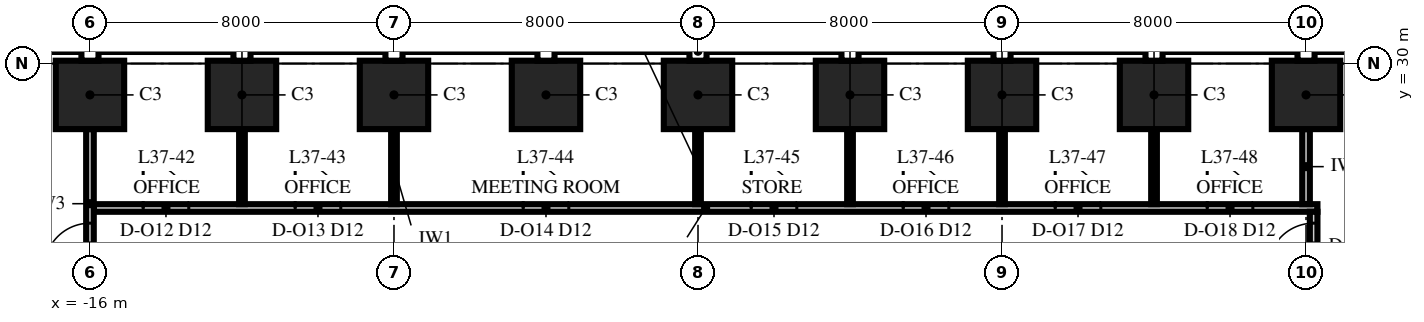
"""IFC4 building model, lengths in metres.
Left out: names, types, materials, properties, quantities, classifications, styles, units other than length and angle.
Written with IfcOpenShell. Run it as: python <this file> out.ifc"""

import sys

from ifc_helpers import new_model, si_unit, direction, frame, frame_2d, origin, origin_2d, place, context, subcontext, project, spatial, rectangle, extrude, element, fill, save


model = new_model("IFC4")
c1 = context("Model", 3, precision=1e-05, world=origin(), true_north=direction((0.0, 1.0)))
c2 = subcontext(c1, "Body", "Model", "MODEL_VIEW")
j1 = project(units=[si_unit("LENGTHUNIT", "METRE"), si_unit("PLANEANGLEUNIT", "RADIAN")], contexts=[c1])
p1 = place(None, origin())
s1 = spatial("IfcSite", under=j1, at=p1, CompositionType="ELEMENT")
p2 = place(p1, origin())
s2 = spatial("IfcBuilding", under=s1, at=p2, CompositionType="ELEMENT")
p3 = place(p2, frame((0.0, 0.0, 163.0)))
s3 = spatial("IfcBuildingStorey", under=s2, at=p3, CompositionType="ELEMENT", Elevation=163.0)
for number, where, z_axis, x_axis in (
    (1, (16.0, 29.175, 0.0), (0.0, 0.0, 1.0), (-1.0, 0.0, 0.0)),
    (2, (12.0, 29.175, 0.0), (0.0, 0.0, 1.0), (-1.0, 0.0, 0.0)),
    (3, (8.0, 29.175, 0.0), (0.0, 0.0, 1.0), (-1.0, 0.0, 0.0)),
    (4, (4.0, 29.175, 0.0), (0.0, 0.0, 1.0), (-1.0, 0.0, 0.0)),
    (5, (0.0, 29.175, 0.0), (0.0, 0.0, 1.0), (-1.0, 0.0, 0.0)),
    (6, (-4.0, 29.175, 0.0), (0.0, 0.0, 1.0), (-1.0, 0.0, 0.0)),
    (7, (-8.0, 29.175, 0.0), (0.0, 0.0, 1.0), (-1.0, 0.0, 0.0)),
    (8, (-12.0, 29.175, 0.0), (0.0, 0.0, 1.0), (-1.0, 0.0, 0.0)),
    (9, (-16.0, 29.175, 0.0), (0.0, 0.0, 1.0), (-1.0, 0.0, 0.0)),
):
    element("IfcColumn", number, at=place(p3, frame(where, z_axis=z_axis, x_axis=x_axis)), inside=s3, PredefinedType="COLUMN", context=c2, shape_type="SweptSolid", body=[
        extrude(rectangle(XDim=1.8, YDim=1.8, at=origin_2d()), origin(), (0.0, 0.0, 1.0), 4.0),
    ])
p4 = place(p3, frame((-15.9, 26.2, 0.0), z_axis=(0.0, 0.0, 1.0), x_axis=(1.0, 0.0, 0.0)))
e10 = element("IfcWall", 10, at=p4, inside=s3, PredefinedType="PARTITIONING", context=c2, shape_type="SweptSolid", body=[
    extrude(rectangle(XDim=32.2, YDim=0.2, at=frame_2d((16.1, 0.0))), origin(), (0.0, 0.0, 1.0), 3.318),
])
p5 = place(p4, frame((1.3, 0.0, 0.0)))
e11 = element("IfcOpeningElement", 11, at=p5, cuts=e10, PredefinedType="OPENING", context=c2, shape_type="SweptSolid", body=[
    extrude(rectangle(XDim=1.2, YDim=2.4, at=frame_2d((0.6, 1.2))), frame((0.0, 0.115, 0.0), z_axis=(0.0, -1.0, 0.0), x_axis=(1.0, 0.0, 0.0)), (0.0, 0.0, 1.0), 0.23),
])
p6 = place(p4, frame((5.3, 0.0, 0.0)))
e12 = element("IfcOpeningElement", 12, at=p6, cuts=e10, PredefinedType="OPENING", context=c2, shape_type="SweptSolid", body=[
    extrude(rectangle(XDim=1.2, YDim=2.4, at=frame_2d((0.6, 1.2))), frame((0.0, 0.115, 0.0), z_axis=(0.0, -1.0, 0.0), x_axis=(1.0, 0.0, 0.0)), (0.0, 0.0, 1.0), 0.23),
])
p7 = place(p4, frame((11.3, 0.0, 0.0)))
e13 = element("IfcOpeningElement", 13, at=p7, cuts=e10, PredefinedType="OPENING", context=c2, shape_type="SweptSolid", body=[
    extrude(rectangle(XDim=1.2, YDim=2.4, at=frame_2d((0.6, 1.2))), frame((0.0, 0.115, 0.0), z_axis=(0.0, -1.0, 0.0), x_axis=(1.0, 0.0, 0.0)), (0.0, 0.0, 1.0), 0.23),
])
p8 = place(p4, frame((17.3, 0.0, 0.0)))
e14 = element("IfcOpeningElement", 14, at=p8, cuts=e10, PredefinedType="OPENING", context=c2, shape_type="SweptSolid", body=[
    extrude(rectangle(XDim=1.2, YDim=2.4, at=frame_2d((0.6, 1.2))), frame((0.0, 0.115, 0.0), z_axis=(0.0, -1.0, 0.0), x_axis=(1.0, 0.0, 0.0)), (0.0, 0.0, 1.0), 0.23),
])
p9 = place(p4, frame((21.3, 0.0, 0.0)))
e15 = element("IfcOpeningElement", 15, at=p9, cuts=e10, PredefinedType="OPENING", context=c2, shape_type="SweptSolid", body=[
    extrude(rectangle(XDim=1.2, YDim=2.4, at=frame_2d((0.6, 1.2))), frame((0.0, 0.115, 0.0), z_axis=(0.0, -1.0, 0.0), x_axis=(1.0, 0.0, 0.0)), (0.0, 0.0, 1.0), 0.23),
])
p10 = place(p4, frame((25.3, 0.0, 0.0)))
e16 = element("IfcOpeningElement", 16, at=p10, cuts=e10, PredefinedType="OPENING", context=c2, shape_type="SweptSolid", body=[
    extrude(rectangle(XDim=1.2, YDim=2.4, at=frame_2d((0.6, 1.2))), frame((0.0, 0.115, 0.0), z_axis=(0.0, -1.0, 0.0), x_axis=(1.0, 0.0, 0.0)), (0.0, 0.0, 1.0), 0.23),
])
p11 = place(p4, frame((29.3, 0.0, 0.0)))
e17 = element("IfcOpeningElement", 17, at=p11, cuts=e10, PredefinedType="OPENING", context=c2, shape_type="SweptSolid", body=[
    extrude(rectangle(XDim=1.2, YDim=2.4, at=frame_2d((0.6, 1.2))), frame((0.0, 0.115, 0.0), z_axis=(0.0, -1.0, 0.0), x_axis=(1.0, 0.0, 0.0)), (0.0, 0.0, 1.0), 0.23),
])
p12 = place(p3, frame((-16.0, 24.35, 0.0), z_axis=(0.0, 0.0, 1.0), x_axis=(0.0, 1.0, 0.0)))
e18 = element("IfcWall", 18, at=p12, inside=s3, PredefinedType="PARTITIONING", context=c2, shape_type="SweptSolid", body=[
    extrude(rectangle(XDim=3.925, YDim=0.2, at=frame_2d((1.962, 0.0))), origin(), (0.0, 0.0, 1.0), 3.226),
])
p13 = place(p12, frame((0.25, 0.0, 0.0)))
e19 = element("IfcOpeningElement", 19, at=p13, cuts=e18, PredefinedType="OPENING", context=c2, shape_type="SweptSolid", body=[
    extrude(rectangle(XDim=1.2, YDim=2.4, at=frame_2d((0.6, 1.2))), frame((0.0, 0.115, 0.0), z_axis=(0.0, -1.0, 0.0), x_axis=(1.0, 0.0, 0.0)), (0.0, 0.0, 1.0), 0.23),
])
for number, where, z_axis, x_axis in (
    (20, (-12.0, 26.3, 0.0), (0.0, 0.0, 1.0), (0.0, 1.0, 0.0)),
    (21, (-8.0, 26.3, 0.0), (0.0, 0.0, 1.0), (0.0, 1.0, 0.0)),
    (22, (0.0, 26.3, 0.0), (0.0, 0.0, 1.0), (0.0, 1.0, 0.0)),
    (23, (4.0, 26.3, 0.0), (0.0, 0.0, 1.0), (0.0, 1.0, 0.0)),
    (24, (8.0, 26.3, 0.0), (0.0, 0.0, 1.0), (0.0, 1.0, 0.0)),
    (25, (12.0, 26.3, 0.0), (0.0, 0.0, 1.0), (0.0, 1.0, 0.0)),
):
    element("IfcWall", number, at=place(p3, frame(where, z_axis=z_axis, x_axis=x_axis)), inside=s3, PredefinedType="PARTITIONING", context=c2, shape_type="SweptSolid", body=[
        extrude(rectangle(XDim=1.975, YDim=0.15, at=frame_2d((0.987, 0.0))), origin(), (0.0, 0.0, 1.0), 3.318),
    ])
p14 = place(p3, frame((16.0, 26.3, 0.0), z_axis=(0.0, 0.0, 1.0), x_axis=(0.0, 1.0, 0.0)))
e26 = element("IfcWall", 26, at=p14, inside=s3, PredefinedType="PARTITIONING", context=c2, shape_type="SweptSolid", body=[
    extrude(rectangle(XDim=1.975, YDim=0.2, at=frame_2d((0.987, 0.0))), origin(), (0.0, 0.0, 1.0), 3.318),
])
p15 = place(p3, frame((16.2, 9.9, 0.0), z_axis=(0.0, 0.0, 1.0), x_axis=(0.0, 1.0, 0.0)))
e27 = element("IfcWall", 27, at=p15, inside=s3, PredefinedType="PARTITIONING", context=c2, shape_type="SweptSolid", body=[
    extrude(rectangle(XDim=16.2, YDim=0.2, at=frame_2d((8.1, 0.0))), origin(), (0.0, 0.0, 1.0), 3.13),
])
p16 = place(p15, frame((14.7, 0.0, 0.0)))
e28 = element("IfcOpeningElement", 28, at=p16, cuts=e27, PredefinedType="OPENING", context=c2, shape_type="SweptSolid", body=[
    extrude(rectangle(XDim=1.2, YDim=2.4, at=frame_2d((0.6, 1.2))), frame((0.0, 0.115, 0.0), z_axis=(0.0, -1.0, 0.0), x_axis=(1.0, 0.0, 0.0)), (0.0, 0.0, 1.0), 0.23),
])
p17 = place(p5, origin())
e29 = element("IfcDoor", 29, at=p17, inside=s3, OperationType="SINGLE_SWING_LEFT", PredefinedType="DOOR", context=c2, shape_type="SweptSolid", body=[
    extrude(rectangle(XDim=1.2, YDim=2.4, at=frame_2d((0.6, 1.2))), frame((0.0, 0.1, 0.0), z_axis=(0.0, -1.0, 0.0), x_axis=(1.0, 0.0, 0.0)), (0.0, 0.0, 1.0), 0.199),
])
fill(e11, e29)
p18 = place(p6, origin())
e30 = element("IfcDoor", 30, at=p18, inside=s3, OperationType="SINGLE_SWING_LEFT", PredefinedType="DOOR", context=c2, shape_type="SweptSolid", body=[
    extrude(rectangle(XDim=1.2, YDim=2.4, at=frame_2d((0.6, 1.2))), frame((0.0, 0.1, 0.0), z_axis=(0.0, -1.0, 0.0), x_axis=(1.0, 0.0, 0.0)), (0.0, 0.0, 1.0), 0.199),
])
fill(e12, e30)
p19 = place(p7, origin())
e31 = element("IfcDoor", 31, at=p19, inside=s3, OperationType="SINGLE_SWING_LEFT", PredefinedType="DOOR", context=c2, shape_type="SweptSolid", body=[
    extrude(rectangle(XDim=1.2, YDim=2.4, at=frame_2d((0.6, 1.2))), frame((0.0, 0.1, 0.0), z_axis=(0.0, -1.0, 0.0), x_axis=(1.0, 0.0, 0.0)), (0.0, 0.0, 1.0), 0.199),
])
fill(e13, e31)
p20 = place(p8, origin())
e32 = element("IfcDoor", 32, at=p20, inside=s3, OperationType="SINGLE_SWING_LEFT", PredefinedType="DOOR", context=c2, shape_type="SweptSolid", body=[
    extrude(rectangle(XDim=1.2, YDim=2.4, at=frame_2d((0.6, 1.2))), frame((0.0, 0.1, 0.0), z_axis=(0.0, -1.0, 0.0), x_axis=(1.0, 0.0, 0.0)), (0.0, 0.0, 1.0), 0.199),
])
fill(e14, e32)
p21 = place(p9, origin())
e33 = element("IfcDoor", 33, at=p21, inside=s3, OperationType="SINGLE_SWING_LEFT", PredefinedType="DOOR", context=c2, shape_type="SweptSolid", body=[
    extrude(rectangle(XDim=1.2, YDim=2.4, at=frame_2d((0.6, 1.2))), frame((0.0, 0.1, 0.0), z_axis=(0.0, -1.0, 0.0), x_axis=(1.0, 0.0, 0.0)), (0.0, 0.0, 1.0), 0.199),
])
fill(e15, e33)
p22 = place(p10, origin())
e34 = element("IfcDoor", 34, at=p22, inside=s3, OperationType="SINGLE_SWING_LEFT", PredefinedType="DOOR", context=c2, shape_type="SweptSolid", body=[
    extrude(rectangle(XDim=1.2, YDim=2.4, at=frame_2d((0.6, 1.2))), frame((0.0, 0.1, 0.0), z_axis=(0.0, -1.0, 0.0), x_axis=(1.0, 0.0, 0.0)), (0.0, 0.0, 1.0), 0.199),
])
fill(e16, e34)
p23 = place(p11, origin())
e35 = element("IfcDoor", 35, at=p23, inside=s3, OperationType="SINGLE_SWING_LEFT", PredefinedType="DOOR", context=c2, shape_type="SweptSolid", body=[
    extrude(rectangle(XDim=1.2, YDim=2.4, at=frame_2d((0.6, 1.2))), frame((0.0, 0.1, 0.0), z_axis=(0.0, -1.0, 0.0), x_axis=(1.0, 0.0, 0.0)), (0.0, 0.0, 1.0), 0.199),
])
fill(e17, e35)
p24 = place(p13, origin())
e36 = element("IfcDoor", 36, at=p24, inside=s3, OperationType="SINGLE_SWING_LEFT", PredefinedType="DOOR", context=c2, shape_type="SweptSolid", body=[
    extrude(rectangle(XDim=1.2, YDim=2.4, at=frame_2d((0.6, 1.2))), frame((0.0, 0.1, 0.0), z_axis=(0.0, -1.0, 0.0), x_axis=(1.0, 0.0, 0.0)), (0.0, 0.0, 1.0), 0.199),
])
fill(e19, e36)
p25 = place(p16, origin())
e37 = element("IfcDoor", 37, at=p25, inside=s3, OperationType="SINGLE_SWING_LEFT", PredefinedType="DOOR", context=c2, shape_type="SweptSolid", body=[
    extrude(rectangle(XDim=1.2, YDim=2.4, at=frame_2d((0.6, 1.2))), frame((0.0, 0.1, 0.0), z_axis=(0.0, -1.0, 0.0), x_axis=(1.0, 0.0, 0.0)), (0.0, 0.0, 1.0), 0.199),
])
fill(e28, e37)
save(model, sys.argv[1])
